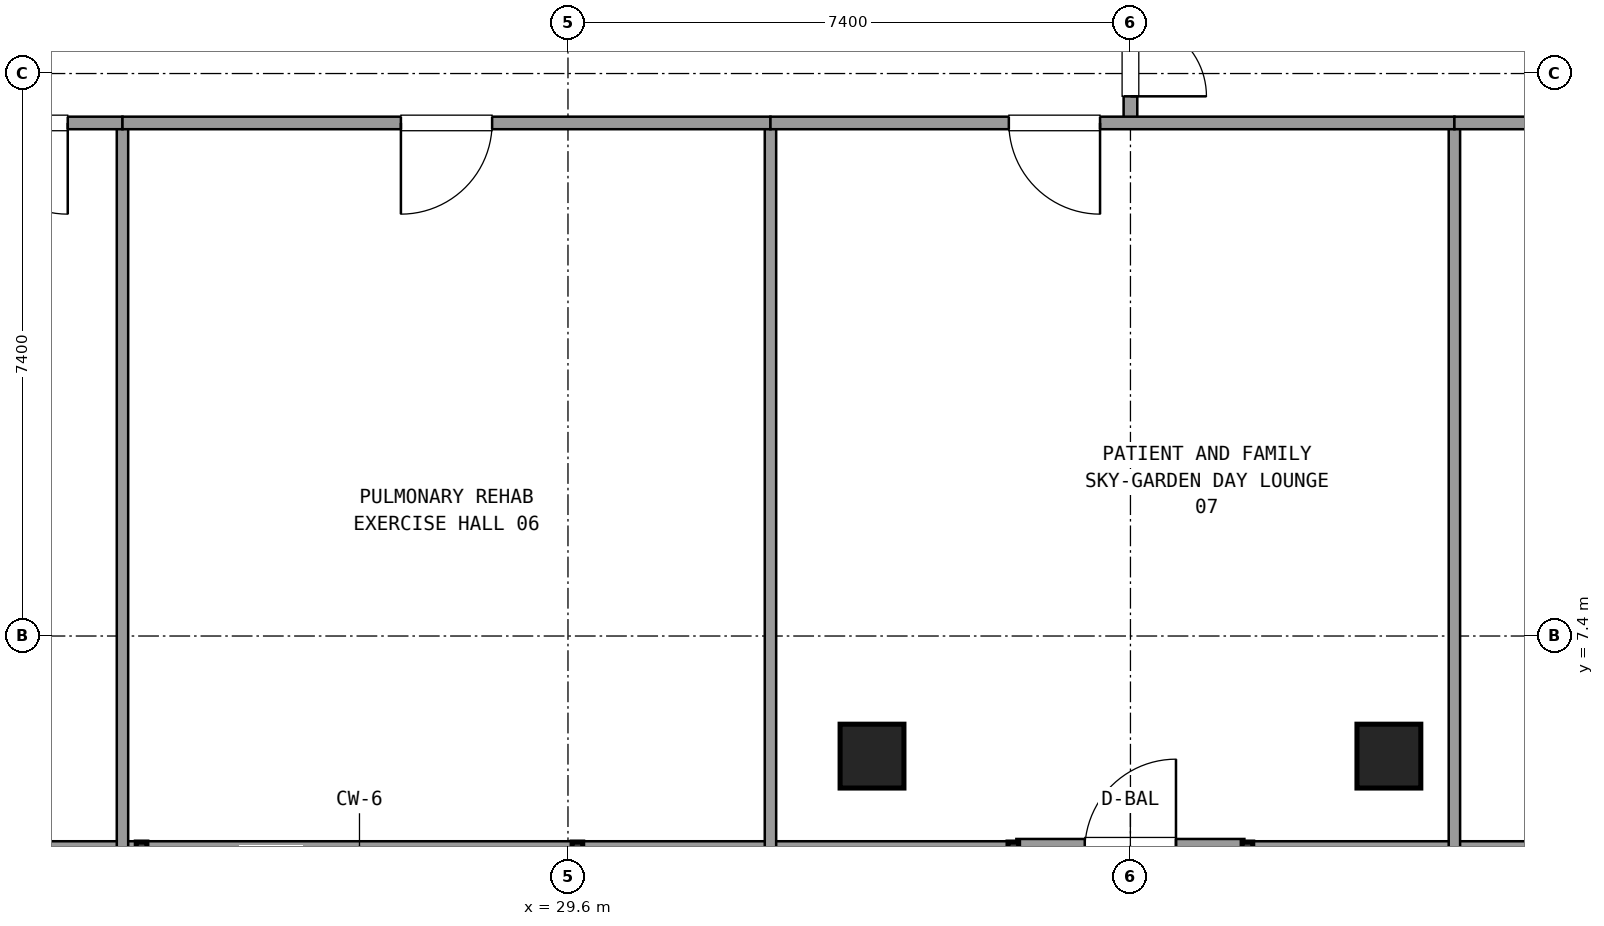
"""IFC4 building model, lengths in metres.
Left out: names, types, materials, properties, quantities, classifications, styles, units other than length and angle.
Written with IfcOpenShell. Run it as: python <this file> out.ifc"""

import sys

from ifc_helpers import new_model, si_unit, direction, frame, frame_2d, origin, origin_2d, place, context, subcontext, project, spatial, rectangle, extrude, element, fill, save


model = new_model("IFC4")
c1 = context("Model", 3, precision=1e-05, world=origin(), true_north=direction((0.0, 1.0)))
c2 = subcontext(c1, "Body", "Model", "MODEL_VIEW")
j1 = project(units=[si_unit("LENGTHUNIT", "METRE"), si_unit("PLANEANGLEUNIT", "RADIAN")], contexts=[c1])
p1 = place(None, origin())
s1 = spatial("IfcSite", under=j1, at=p1, CompositionType="ELEMENT")
p2 = place(p1, origin())
s2 = spatial("IfcBuilding", under=s1, at=p2, CompositionType="ELEMENT")
p3 = place(p2, frame((0.0, 0.0, 268.02)))
s3 = spatial("IfcBuildingStorey", under=s2, at=p3, CompositionType="ELEMENT", Elevation=268.02)
for number, where, z_axis, x_axis in (
    (1, (33.6, 5.82, 0.0), (0.0, 0.0, 1.0), (1.0, 0.0, 0.0)),
    (2, (40.4, 5.82, 0.0), (0.0, 0.0, 1.0), (1.0, 0.0, 0.0)),
):
    element("IfcColumn", number, at=place(p3, frame(where, z_axis=z_axis, x_axis=x_axis)), inside=s3, PredefinedType="COLUMN", context=c2, shape_type="SweptSolid", body=[
        extrude(rectangle(XDim=0.84, YDim=0.84, at=origin_2d()), origin(), (0.0, 0.0, 1.0), 3.6),
    ])
p4 = place(p3, frame((35.499, 4.58, 0.0), z_axis=(0.0, 0.0, 1.0), x_axis=(1.0, 0.0, 0.0)))
e3 = element("IfcWall", 3, at=p4, inside=s3, PredefinedType="SOLIDWALL", context=c2, shape_type="SweptSolid", body=[
    extrude(rectangle(XDim=3.0, YDim=0.3, at=frame_2d((1.5, 0.0))), origin(), (0.0, 0.0, 1.0), 2.69),
])
p5 = place(p4, frame((0.9, 0.0, 0.0)))
e4 = element("IfcOpeningElement", 4, at=p5, cuts=e3, PredefinedType="OPENING", context=c2, shape_type="SweptSolid", body=[
    extrude(rectangle(XDim=1.2, YDim=2.2, at=frame_2d((0.6, 1.1))), frame((0.0, 0.16, 0.0), z_axis=(0.0, -1.0, 0.0), x_axis=(1.0, 0.0, 0.0)), (0.0, 0.0, 1.0), 0.32),
])
p6 = place(p3, frame((18.255, 4.58, 0.0), z_axis=(0.0, 0.0, 1.0), x_axis=(1.0, 0.0, 0.0)))
e5 = element("IfcWall", 5, at=p6, inside=s3, PredefinedType="SOLIDWALL", context=c2, shape_type="SweptSolid", body=[
    extrude(rectangle(XDim=17.204, YDim=0.24, at=frame_2d((8.602, 0.0))), origin(), (0.0, 0.0, 1.0), 0.85),
])
p7 = place(p3, frame((38.539, 4.58, 0.0), z_axis=(0.0, 0.0, 1.0), x_axis=(1.0, 0.0, 0.0)))
e6 = element("IfcWall", 6, at=p7, inside=s3, PredefinedType="SOLIDWALL", context=c2, shape_type="SweptSolid", body=[
    extrude(rectangle(XDim=17.206, YDim=0.24, at=frame_2d((8.603, 0.0))), origin(), (0.0, 0.0, 1.0), 0.85),
])
p8 = place(p3, frame((37.0, 14.15, 0.0), z_axis=(0.0, 0.0, 1.0), x_axis=(0.0, 1.0, 0.0)))
e7 = element("IfcWall", 7, at=p8, inside=s3, PredefinedType="PARTITIONING", context=c2, shape_type="SweptSolid", body=[
    extrude(rectangle(XDim=2.7, YDim=0.18, at=frame_2d((1.35, 0.0))), origin(), (0.0, 0.0, 1.0), 2.61),
])
p9 = place(p8, frame((0.35, 0.0, 0.0)))
e8 = element("IfcOpeningElement", 8, at=p9, cuts=e7, PredefinedType="OPENING", context=c2, shape_type="SweptSolid", body=[
    extrude(rectangle(XDim=2.0, YDim=2.2, at=frame_2d((1.0, 1.1))), frame((0.0, 0.1, 0.0), z_axis=(0.0, -1.0, 0.0), x_axis=(1.0, 0.0, 0.0)), (0.0, 0.0, 1.0), 0.2),
])
p10 = place(p3, frame((23.739, 14.15, 0.0), z_axis=(0.0, 0.0, 1.0), x_axis=(0.0, -1.0, 0.0)))
e9 = element("IfcWall", 9, at=p10, inside=s3, PredefinedType="PARTITIONING", context=c2, shape_type="SweptSolid", body=[
    extrude(rectangle(XDim=9.55, YDim=0.15, at=frame_2d((4.775, 0.0))), origin(), (0.0, 0.0, 1.0), 2.61),
])
p11 = place(p3, frame((21.1, 14.15, 0.0), z_axis=(0.0, 0.0, 1.0), x_axis=(1.0, 0.0, 0.0)))
e10 = element("IfcWall", 10, at=p11, inside=s3, PredefinedType="PARTITIONING", context=c2, shape_type="SweptSolid", body=[
    extrude(rectangle(XDim=2.639, YDim=0.165, at=frame_2d((1.319, 0.0))), origin(), (0.0, 0.0, 1.0), 2.61),
])
p12 = place(p11, frame((0.719, 0.0, 0.0)))
e11 = element("IfcOpeningElement", 11, at=p12, cuts=e10, PredefinedType="OPENING", context=c2, shape_type="SweptSolid", body=[
    extrude(rectangle(XDim=1.2, YDim=2.15, at=frame_2d((0.6, 1.075))), frame((0.0, 0.093, 0.0), z_axis=(0.0, -1.0, 0.0), x_axis=(1.0, 0.0, 0.0)), (0.0, 0.0, 1.0), 0.185),
])
p13 = place(p3, frame((32.264, 14.15, 0.0), z_axis=(0.0, 0.0, 1.0), x_axis=(0.0, -1.0, 0.0)))
e12 = element("IfcWall", 12, at=p13, inside=s3, PredefinedType="PARTITIONING", context=c2, shape_type="SweptSolid", body=[
    extrude(rectangle(XDim=9.55, YDim=0.15, at=frame_2d((4.775, 0.0))), origin(), (0.0, 0.0, 1.0), 2.61),
])
p14 = place(p3, frame((23.739, 14.15, 0.0), z_axis=(0.0, 0.0, 1.0), x_axis=(1.0, 0.0, 0.0)))
e13 = element("IfcWall", 13, at=p14, inside=s3, PredefinedType="PARTITIONING", context=c2, shape_type="SweptSolid", body=[
    extrude(rectangle(XDim=8.525, YDim=0.165, at=frame_2d((4.262, 0.0))), origin(), (0.0, 0.0, 1.0), 2.61),
])
p15 = place(p14, frame((3.663, 0.0, 0.0)))
e14 = element("IfcOpeningElement", 14, at=p15, cuts=e13, PredefinedType="OPENING", context=c2, shape_type="SweptSolid", body=[
    extrude(rectangle(XDim=1.2, YDim=2.15, at=frame_2d((0.6, 1.075))), frame((0.0, 0.093, 0.0), z_axis=(0.0, -1.0, 0.0), x_axis=(1.0, 0.0, 0.0)), (0.0, 0.0, 1.0), 0.185),
])
p16 = place(p3, frame((41.262, 14.15, 0.0), z_axis=(0.0, 0.0, 1.0), x_axis=(0.0, -1.0, 0.0)))
e15 = element("IfcWall", 15, at=p16, inside=s3, PredefinedType="PARTITIONING", context=c2, shape_type="SweptSolid", body=[
    extrude(rectangle(XDim=9.55, YDim=0.15, at=frame_2d((4.775, 0.0))), origin(), (0.0, 0.0, 1.0), 2.61),
])
p17 = place(p3, frame((32.264, 14.15, 0.0), z_axis=(0.0, 0.0, 1.0), x_axis=(1.0, 0.0, 0.0)))
e16 = element("IfcWall", 16, at=p17, inside=s3, PredefinedType="PARTITIONING", context=c2, shape_type="SweptSolid", body=[
    extrude(rectangle(XDim=8.998, YDim=0.165, at=frame_2d((4.499, 0.0))), origin(), (0.0, 0.0, 1.0), 2.61),
])
p18 = place(p17, frame((3.136, 0.0, 0.0)))
e17 = element("IfcOpeningElement", 17, at=p18, cuts=e16, PredefinedType="OPENING", context=c2, shape_type="SweptSolid", body=[
    extrude(rectangle(XDim=1.2, YDim=2.15, at=frame_2d((0.6, 1.075))), frame((0.0, 0.093, 0.0), z_axis=(0.0, -1.0, 0.0), x_axis=(1.0, 0.0, 0.0)), (0.0, 0.0, 1.0), 0.185),
])
p19 = place(p3, frame((41.262, 14.15, 0.0), z_axis=(0.0, 0.0, 1.0), x_axis=(1.0, 0.0, 0.0)))
e18 = element("IfcWall", 18, at=p19, inside=s3, PredefinedType="PARTITIONING", context=c2, shape_type="SweptSolid", body=[
    extrude(rectangle(XDim=9.088, YDim=0.165, at=frame_2d((4.544, 0.0))), origin(), (0.0, 0.0, 1.0), 2.61),
])
p20 = place(p19, frame((3.944, 0.0, 0.0)))
e19 = element("IfcOpeningElement", 19, at=p20, cuts=e18, PredefinedType="OPENING", context=c2, shape_type="SweptSolid", body=[
    extrude(rectangle(XDim=1.2, YDim=2.15, at=frame_2d((0.6, 1.075))), frame((0.0, 0.093, 0.0), z_axis=(0.0, -1.0, 0.0), x_axis=(1.0, 0.0, 0.0)), (0.0, 0.0, 1.0), 0.185),
])
p21 = place(p9, frame((2.0, 0.0, 0.0), z_axis=(0.0, 0.0, 1.0), x_axis=(-1.0, 0.0, 0.0)))
e20 = element("IfcDoor", 20, at=p21, inside=s3, OperationType="DOUBLE_DOOR_SINGLE_SWING", PredefinedType="DOOR", context=c2, shape_type="SweptSolid", body=[
    extrude(rectangle(XDim=2.0, YDim=2.2, at=frame_2d((1.0, 1.1))), frame((0.0, 0.025, 0.0), z_axis=(0.0, -1.0, 0.0), x_axis=(1.0, 0.0, 0.0)), (0.0, 0.0, 1.0), 0.05),
])
fill(e8, e20)
p22 = place(p12, frame((1.2, 0.0, 0.0), z_axis=(0.0, 0.0, 1.0), x_axis=(-1.0, 0.0, 0.0)))
e21 = element("IfcDoor", 21, at=p22, inside=s3, OperationType="SINGLE_SWING_RIGHT", PredefinedType="DOOR", context=c2, shape_type="SweptSolid", body=[
    extrude(rectangle(XDim=1.2, YDim=2.15, at=frame_2d((0.6, 1.075))), frame((0.0, 0.025, 0.0), z_axis=(0.0, -1.0, 0.0), x_axis=(1.0, 0.0, 0.0)), (0.0, 0.0, 1.0), 0.05),
])
fill(e11, e21)
p23 = place(p15, frame((1.2, 0.0, 0.0), z_axis=(0.0, 0.0, 1.0), x_axis=(-1.0, 0.0, 0.0)))
e22 = element("IfcDoor", 22, at=p23, inside=s3, OperationType="SINGLE_SWING_LEFT", PredefinedType="DOOR", context=c2, shape_type="SweptSolid", body=[
    extrude(rectangle(XDim=1.2, YDim=2.15, at=frame_2d((0.6, 1.075))), frame((0.0, 0.025, 0.0), z_axis=(0.0, -1.0, 0.0), x_axis=(1.0, 0.0, 0.0)), (0.0, 0.0, 1.0), 0.05),
])
fill(e14, e22)
p24 = place(p18, frame((1.2, 0.0, 0.0), z_axis=(0.0, 0.0, 1.0), x_axis=(-1.0, 0.0, 0.0)))
e23 = element("IfcDoor", 23, at=p24, inside=s3, OperationType="SINGLE_SWING_RIGHT", PredefinedType="DOOR", context=c2, shape_type="SweptSolid", body=[
    extrude(rectangle(XDim=1.2, YDim=2.15, at=frame_2d((0.6, 1.075))), frame((0.0, 0.025, 0.0), z_axis=(0.0, -1.0, 0.0), x_axis=(1.0, 0.0, 0.0)), (0.0, 0.0, 1.0), 0.05),
])
fill(e17, e23)
save(model, sys.argv[1])
